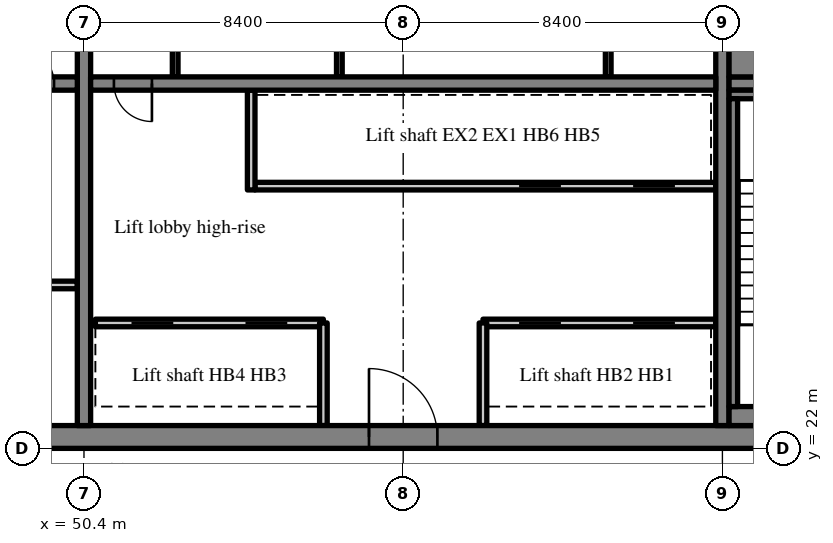
"""IFC4 building model, lengths in metres.
Left out: names, types, materials, properties, quantities, classifications, styles, units other than length and angle.
Written with IfcOpenShell. Run it as: python <this file> out.ifc"""

import sys

from ifc_helpers import new_model, si_unit, direction, frame, frame_2d, origin, place, context, subcontext, project, spatial, rectangle, extrude, source, transform, mapped, element, fill, save


model = new_model("IFC4")
c1 = context("Model", 3, precision=1e-05, world=origin(), true_north=direction((0.0, 1.0)))
c2 = subcontext(c1, "Body", "Model", "MODEL_VIEW")
j1 = project(units=[si_unit("LENGTHUNIT", "METRE"), si_unit("PLANEANGLEUNIT", "RADIAN")], contexts=[c1])
p1 = place(None, origin())
s1 = spatial("IfcSite", under=j1, at=p1, CompositionType="ELEMENT")
p2 = place(p1, origin())
s2 = spatial("IfcBuilding", under=s1, at=p2, CompositionType="ELEMENT")
p3 = place(p2, frame((0.0, 0.0, 221.8)))
s3 = spatial("IfcBuildingStorey", under=s2, at=p3, CompositionType="ELEMENT", Elevation=221.8)
m1 = source(origin(), c2, "Body", "SweptSolid", [
    extrude(rectangle(XDim=50.4, YDim=0.6, at=frame_2d((25.2, 0.0))), origin(), (0.0, 0.0, 1.0), 3.62),
])
p4 = place(p3, frame((25.2, 22.3, 0.0), z_axis=(0.0, 0.0, 1.0), x_axis=(1.0, 0.0, 0.0)))
e1 = element("IfcWall", 1, at=p4, inside=s3, PredefinedType="SHEAR", context=c2, shape_type="MappedRepresentation", body=[
    mapped(m1, transform((0.0, 0.0, 0.0), scale=1.0)),
])
m2 = source(origin(), c2, "Body", "SweptSolid", [
    extrude(rectangle(XDim=1.8, YDim=2.1, at=frame_2d((0.9, 1.05))), frame((0.0, 0.31, 0.0), z_axis=(0.0, -1.0, 0.0), x_axis=(1.0, 0.0, 0.0)), (0.0, 0.0, 1.0), 0.62),
])
p5 = place(p4, frame((15.9, 0.0, 0.0)))
e2 = element("IfcOpeningElement", 2, at=p5, cuts=e1, PredefinedType="OPENING", context=c2, shape_type="MappedRepresentation", body=[
    mapped(m2, transform((0.0, 0.0, 0.0), scale=1.0)),
])
m3 = source(origin(), c2, "Body", "SweptSolid", [
    extrude(rectangle(XDim=0.9, YDim=2.1, at=frame_2d((0.45, 1.05))), frame((0.0, 0.31, 0.0), z_axis=(0.0, -1.0, 0.0), x_axis=(1.0, 0.0, 0.0)), (0.0, 0.0, 1.0), 0.62),
])
p6 = place(p4, frame((9.687, 0.0, 0.0)))
e3 = element("IfcOpeningElement", 3, at=p6, cuts=e1, PredefinedType="OPENING", context=c2, shape_type="MappedRepresentation", body=[
    mapped(m3, transform((0.0, 0.0, 0.0), scale=1.0)),
])
p7 = place(p4, frame((21.513, 0.0, 0.0)))
e4 = element("IfcOpeningElement", 4, at=p7, cuts=e1, PredefinedType="OPENING", context=c2, shape_type="MappedRepresentation", body=[
    mapped(m3, transform((0.0, 0.0, 0.0), scale=1.0)),
])
p8 = place(p4, frame((32.7, 0.0, 0.0)))
e5 = element("IfcOpeningElement", 5, at=p8, cuts=e1, PredefinedType="OPENING", context=c2, shape_type="MappedRepresentation", body=[
    mapped(m2, transform((0.0, 0.0, 0.0), scale=1.0)),
])
m4 = source(origin(), c2, "Body", "SweptSolid", [
    extrude(rectangle(XDim=1.2, YDim=2.1, at=frame_2d((0.6, 1.05))), frame((0.0, 0.31, 0.0), z_axis=(0.0, -1.0, 0.0), x_axis=(1.0, 0.0, 0.0)), (0.0, 0.0, 1.0), 0.62),
])
p9 = place(p4, frame((6.488, 0.0, 0.0)))
e6 = element("IfcOpeningElement", 6, at=p9, cuts=e1, PredefinedType="OPENING", context=c2, shape_type="MappedRepresentation", body=[
    mapped(m4, transform((0.0, 0.0, 0.0), scale=1.0)),
])
p10 = place(p4, frame((47.925, 0.0, 0.0)))
e7 = element("IfcOpeningElement", 7, at=p10, cuts=e1, PredefinedType="OPENING", context=c2, shape_type="MappedRepresentation", body=[
    mapped(m4, transform((0.0, 0.0, 0.0), scale=1.0)),
])
m5 = source(origin(), c2, "Body", "SweptSolid", [
    extrude(rectangle(XDim=18.8, YDim=0.35, at=frame_2d((9.4, 0.0))), origin(), (0.0, 0.0, 1.0), 3.62),
])
p11 = place(p3, frame((50.4, 22.6, 0.0), z_axis=(0.0, 0.0, 1.0), x_axis=(0.0, 1.0, 0.0)))
e8 = element("IfcWall", 8, at=p11, inside=s3, PredefinedType="SHEAR", context=c2, shape_type="MappedRepresentation", body=[
    mapped(m5, transform((0.0, 0.0, 0.0), scale=1.0)),
])
m6 = source(origin(), c2, "Body", "SweptSolid", [
    extrude(rectangle(XDim=1.1, YDim=2.1, at=frame_2d((0.55, 1.05))), frame((0.0, 0.185, 0.0), z_axis=(0.0, -1.0, 0.0), x_axis=(1.0, 0.0, 0.0)), (0.0, 0.0, 1.0), 0.37),
])
p12 = place(p11, frame((12.85, 0.0, 0.0)))
e9 = element("IfcOpeningElement", 9, at=p12, cuts=e8, PredefinedType="OPENING", context=c2, shape_type="MappedRepresentation", body=[
    mapped(m6, transform((0.0, 0.0, 0.0), scale=1.0)),
])
p13 = place(p3, frame((67.2, 22.6, 0.0), z_axis=(0.0, 0.0, 1.0), x_axis=(0.0, 1.0, 0.0)))
e10 = element("IfcWall", 10, at=p13, inside=s3, PredefinedType="SHEAR", context=c2, shape_type="MappedRepresentation", body=[
    mapped(m5, transform((0.0, 0.0, 0.0), scale=1.0)),
])
m7 = source(origin(), c2, "Body", "SweptSolid", [
    extrude(rectangle(XDim=16.45, YDim=0.35, at=frame_2d((8.225, 0.0))), origin(), (0.0, 0.0, 1.0), 3.62),
])
p14 = place(p3, frame((33.775, 31.6, 0.0), z_axis=(0.0, 0.0, 1.0), x_axis=(1.0, 0.0, 0.0)))
e11 = element("IfcWall", 11, at=p14, inside=s3, PredefinedType="SHEAR", context=c2, shape_type="MappedRepresentation", body=[
    mapped(m7, transform((0.0, 0.0, 0.0), scale=1.0)),
])
m8 = source(origin(), c2, "Body", "SweptSolid", [
    extrude(rectangle(XDim=1.0, YDim=2.1, at=frame_2d((0.5, 1.05))), frame((0.0, 0.185, 0.0), z_axis=(0.0, -1.0, 0.0), x_axis=(1.0, 0.0, 0.0)), (0.0, 0.0, 1.0), 0.37),
])
p15 = place(p14, frame((14.837, 0.0, 0.0)))
e12 = element("IfcOpeningElement", 12, at=p15, cuts=e11, PredefinedType="OPENING", context=c2, shape_type="MappedRepresentation", body=[
    mapped(m8, transform((0.0, 0.0, 0.0), scale=1.0)),
])
m9 = source(origin(), c2, "Body", "SweptSolid", [
    extrude(rectangle(XDim=16.45, YDim=0.35, at=frame_2d((8.225, 0.0))), origin(), (0.0, 0.0, 1.0), 3.62),
])
p16 = place(p3, frame((50.575, 31.6, 0.0), z_axis=(0.0, 0.0, 1.0), x_axis=(1.0, 0.0, 0.0)))
e13 = element("IfcWall", 13, at=p16, inside=s3, PredefinedType="SHEAR", context=c2, shape_type="MappedRepresentation", body=[
    mapped(m9, transform((0.0, 0.0, 0.0), scale=1.0)),
])
p17 = place(p16, frame((0.613, 0.0, 0.0)))
e14 = element("IfcOpeningElement", 14, at=p17, cuts=e13, PredefinedType="OPENING", context=c2, shape_type="MappedRepresentation", body=[
    mapped(m8, transform((0.0, 0.0, 0.0), scale=1.0)),
])
m10 = source(origin(), c2, "Body", "SweptSolid", [
    extrude(rectangle(XDim=7.625, YDim=0.35, at=frame_2d((3.812, 0.0))), origin(), (0.0, 0.0, 1.0), 3.62),
])
p18 = place(p3, frame((67.375, 31.6, 0.0), z_axis=(0.0, 0.0, 1.0), x_axis=(1.0, 0.0, 0.0)))
e15 = element("IfcWall", 15, at=p18, inside=s3, PredefinedType="SHEAR", context=c2, shape_type="MappedRepresentation", body=[
    mapped(m10, transform((0.0, 0.0, 0.0), scale=1.0)),
])
p19 = place(p18, frame((5.8, 0.0, 0.0)))
e16 = element("IfcOpeningElement", 16, at=p19, cuts=e15, PredefinedType="OPENING", context=c2, shape_type="MappedRepresentation", body=[
    mapped(m6, transform((0.0, 0.0, 0.0), scale=1.0)),
])
m11 = source(origin(), c2, "Body", "SweptSolid", [
    extrude(rectangle(XDim=6.125, YDim=0.2, at=frame_2d((3.062, 0.0))), origin(), (0.0, 0.0, 1.0), 3.62),
])
p20 = place(p3, frame((44.1, 26.3, 0.0), z_axis=(0.0, 0.0, 1.0), x_axis=(1.0, 0.0, 0.0)))
e17 = element("IfcWall", 17, at=p20, inside=s3, PredefinedType="PARTITIONING", context=c2, shape_type="MappedRepresentation", body=[
    mapped(m11, transform((0.0, 0.0, 0.0), scale=1.0)),
])
p21 = place(p3, frame((67.025, 25.3, 0.0), z_axis=(0.0, 0.0, 1.0), x_axis=(-1.0, 0.0, 0.0)))
e18 = element("IfcWall", 18, at=p21, inside=s3, PredefinedType="SOLIDWALL", context=c2, shape_type="MappedRepresentation", body=[
    mapped(m11, transform((0.0, 0.0, 0.0), scale=1.0)),
])
m12 = source(origin(), c2, "Body", "SweptSolid", [
    extrude(rectangle(XDim=1.1, YDim=2.1, at=frame_2d((0.55, 1.05))), frame((0.0, 0.11, 0.0), z_axis=(0.0, -1.0, 0.0), x_axis=(1.0, 0.0, 0.0)), (0.0, 0.0, 1.0), 0.22),
])
p22 = place(p21, frame((1.075, 0.0, 0.0)))
e19 = element("IfcOpeningElement", 19, at=p22, cuts=e18, PredefinedType="OPENING", context=c2, shape_type="MappedRepresentation", body=[
    mapped(m12, transform((0.0, 0.0, 0.0), scale=1.0)),
])
p23 = place(p21, frame((4.075, 0.0, 0.0)))
e20 = element("IfcOpeningElement", 20, at=p23, cuts=e18, PredefinedType="OPENING", context=c2, shape_type="MappedRepresentation", body=[
    mapped(m12, transform((0.0, 0.0, 0.0), scale=1.0)),
])
m13 = source(origin(), c2, "Body", "SweptSolid", [
    extrude(rectangle(XDim=6.0, YDim=0.2, at=frame_2d((3.0, 0.0))), origin(), (0.0, 0.0, 1.0), 3.62),
])
p24 = place(p3, frame((56.7, 25.3, 0.0), z_axis=(0.0, 0.0, 1.0), x_axis=(-1.0, 0.0, 0.0)))
e21 = element("IfcWall", 21, at=p24, inside=s3, PredefinedType="SOLIDWALL", context=c2, shape_type="MappedRepresentation", body=[
    mapped(m13, transform((0.0, 0.0, 0.0), scale=1.0)),
])
p25 = place(p24, frame((0.95, 0.0, 0.0)))
e22 = element("IfcOpeningElement", 22, at=p25, cuts=e21, PredefinedType="OPENING", context=c2, shape_type="MappedRepresentation", body=[
    mapped(m12, transform((0.0, 0.0, 0.0), scale=1.0)),
])
p26 = place(p24, frame((3.95, 0.0, 0.0)))
e23 = element("IfcOpeningElement", 23, at=p26, cuts=e21, PredefinedType="OPENING", context=c2, shape_type="MappedRepresentation", body=[
    mapped(m12, transform((0.0, 0.0, 0.0), scale=1.0)),
])
m14 = source(origin(), c2, "Body", "SweptSolid", [
    extrude(rectangle(XDim=12.125, YDim=0.2, at=frame_2d((6.062, 0.0))), origin(), (0.0, 0.0, 1.0), 3.62),
])
p27 = place(p3, frame((67.025, 28.9, 0.0), z_axis=(0.0, 0.0, 1.0), x_axis=(-1.0, 0.0, 0.0)))
e24 = element("IfcWall", 24, at=p27, inside=s3, PredefinedType="SOLIDWALL", context=c2, shape_type="MappedRepresentation", body=[
    mapped(m14, transform((0.0, 0.0, 0.0), scale=1.0)),
])
p28 = place(p27, frame((1.075, 0.0, 0.0)))
e25 = element("IfcOpeningElement", 25, at=p28, cuts=e24, PredefinedType="OPENING", context=c2, shape_type="MappedRepresentation", body=[
    mapped(m12, transform((0.0, 0.0, 0.0), scale=1.0)),
])
p29 = place(p27, frame((4.075, 0.0, 0.0)))
e26 = element("IfcOpeningElement", 26, at=p29, cuts=e24, PredefinedType="OPENING", context=c2, shape_type="MappedRepresentation", body=[
    mapped(m12, transform((0.0, 0.0, 0.0), scale=1.0)),
])
m15 = source(origin(), c2, "Body", "SweptSolid", [
    extrude(rectangle(XDim=2.7, YDim=0.2, at=frame_2d((1.35, 0.0))), origin(), (0.0, 0.0, 1.0), 3.62),
])
for number, where, z_axis, x_axis in (
    (27, (60.9, 22.6, 0.0), (0.0, 0.0, 1.0), (0.0, 1.0, 0.0)),
    (28, (56.7, 22.6, 0.0), (0.0, 0.0, 1.0), (0.0, 1.0, 0.0)),
):
    element("IfcWall", number, at=place(p3, frame(where, z_axis=z_axis, x_axis=x_axis)), inside=s3, PredefinedType="SOLIDWALL", context=c2, shape_type="MappedRepresentation", body=[
        mapped(m15, transform((0.0, 0.0, 0.0), scale=1.0)),
    ])
m16 = source(origin(), c2, "Body", "SweptSolid", [
    extrude(rectangle(XDim=2.625, YDim=0.2, at=frame_2d((1.312, 0.0))), origin(), (0.0, 0.0, 1.0), 3.62),
])
p30 = place(p3, frame((54.8, 28.8, 0.0), z_axis=(0.0, 0.0, 1.0), x_axis=(0.0, 1.0, 0.0)))
e29 = element("IfcWall", 29, at=p30, inside=s3, PredefinedType="SOLIDWALL", context=c2, shape_type="MappedRepresentation", body=[
    mapped(m16, transform((0.0, 0.0, 0.0), scale=1.0)),
])
m17 = source(origin(), c2, "Body", "SweptSolid", [
    extrude(rectangle(XDim=3.225, YDim=0.15, at=frame_2d((1.613, 0.0))), origin(), (0.0, 0.0, 1.0), 3.62),
])
for number, where, z_axis, x_axis in (
    (30, (52.8, 31.775, 0.0), (0.0, 0.0, 1.0), (0.0, 1.0, 0.0)),
    (31, (64.195, 31.775, 0.0), (0.0, 0.0, 1.0), (0.0, 1.0, 0.0)),
    (32, (57.12, 31.775, 0.0), (0.0, 0.0, 1.0), (0.0, 1.0, 0.0)),
):
    element("IfcWall", number, at=place(p3, frame(where, z_axis=z_axis, x_axis=x_axis)), inside=s3, PredefinedType="PARTITIONING", context=c2, shape_type="MappedRepresentation", body=[
        mapped(m17, transform((0.0, 0.0, 0.0), scale=1.0)),
    ])
m18 = source(origin(), c2, "Body", "SweptSolid", [
    extrude(rectangle(XDim=4.875, YDim=0.5, at=frame_2d((2.438, 0.0))), origin(), (0.0, 0.0, 1.0), 3.62),
])
p31 = place(p3, frame((67.375, 22.85, 0.0), z_axis=(0.0, 0.0, 1.0), x_axis=(1.0, 0.0, 0.0)))
e33 = element("IfcWall", 33, at=p31, inside=s3, PredefinedType="SOLIDWALL", context=c2, shape_type="MappedRepresentation", body=[
    mapped(m18, transform((0.0, 0.0, 0.0), scale=1.0)),
])
m19 = source(origin(), c2, "Body", "SweptSolid", [
    extrude(rectangle(XDim=4.875, YDim=0.225, at=frame_2d((2.438, 0.0))), origin(), (0.0, 0.0, 1.0), 3.62),
])
p32 = place(p3, frame((67.375, 31.312, 0.0), z_axis=(0.0, 0.0, 1.0), x_axis=(1.0, 0.0, 0.0)))
e34 = element("IfcWall", 34, at=p32, inside=s3, PredefinedType="SOLIDWALL", context=c2, shape_type="MappedRepresentation", body=[
    mapped(m19, transform((0.0, 0.0, 0.0), scale=1.0)),
])
m20 = source(origin(), c2, "Body", "SweptSolid", [
    extrude(rectangle(XDim=8.1, YDim=0.225, at=frame_2d((4.05, 0.0))), origin(), (0.0, 0.0, 1.0), 3.62),
])
p33 = place(p3, frame((67.487, 23.1, 0.0), z_axis=(0.0, 0.0, 1.0), x_axis=(0.0, 1.0, 0.0)))
e35 = element("IfcWall", 35, at=p33, inside=s3, PredefinedType="SOLIDWALL", context=c2, shape_type="MappedRepresentation", body=[
    mapped(m20, transform((0.0, 0.0, 0.0), scale=1.0)),
])
m21 = source(origin(), c2, "Body", "SweptSolid", [
    extrude(rectangle(XDim=4.875, YDim=1.025, at=frame_2d((2.438, 0.0))), origin(), (0.0, 0.0, 1.0), 3.62),
])
p34 = place(p3, frame((67.375, 32.287, 0.0), z_axis=(0.0, 0.0, 1.0), x_axis=(1.0, 0.0, 0.0)))
e36 = element("IfcWall", 36, at=p34, inside=s3, PredefinedType="SOLIDWALL", context=c2, shape_type="MappedRepresentation", body=[
    mapped(m21, transform((0.0, 0.0, 0.0), scale=1.0)),
])
m22 = source(origin(), c2, "Body", "SweptSolid", [
    extrude(rectangle(XDim=1.0, YDim=2.1, at=frame_2d((0.5, 1.05))), frame((0.0, 0.025, 0.0), z_axis=(0.0, -1.0, 0.0), x_axis=(1.0, 0.0, 0.0)), (0.0, 0.0, 1.0), 0.05),
])
p35 = place(p15, origin())
e37 = element("IfcDoor", 37, at=p35, inside=s3, OperationType="SINGLE_SWING_LEFT", PredefinedType="DOOR", context=c2, shape_type="MappedRepresentation", body=[
    mapped(m22, transform((0.0, 0.0, 0.0), scale=1.0)),
])
fill(e12, e37)
m23 = source(origin(), c2, "Body", "SweptSolid", [
    extrude(rectangle(XDim=1.8, YDim=2.1, at=frame_2d((0.9, 1.05))), frame((0.0, 0.225, 0.0), z_axis=(0.0, -1.0, 0.0), x_axis=(1.0, 0.0, 0.0)), (0.0, 0.0, 1.0), 0.05),
])
p36 = place(p8, origin())
e38 = element("IfcDoor", 38, at=p36, inside=s3, OperationType="DOUBLE_DOOR_SINGLE_SWING", PredefinedType="DOOR", context=c2, shape_type="MappedRepresentation", body=[
    mapped(m23, transform((0.0, 0.0, 0.0), scale=1.0)),
])
fill(e5, e38)
p37 = place(p17, origin())
e39 = element("IfcDoor", 39, at=p37, inside=s3, OperationType="SINGLE_SWING_RIGHT", PredefinedType="DOOR", context=c2, shape_type="MappedRepresentation", body=[
    mapped(m22, transform((0.0, 0.0, 0.0), scale=1.0)),
])
fill(e14, e39)
m24 = source(origin(), c2, "Body", "SweptSolid", [
    extrude(rectangle(XDim=1.1, YDim=2.1, at=frame_2d((0.55, 1.05))), frame((0.0, 0.025, 0.0), z_axis=(0.0, -1.0, 0.0), x_axis=(1.0, 0.0, 0.0)), (0.0, 0.0, 1.0), 0.05),
])
p38 = place(p22, origin())
e40 = element("IfcDoor", 40, at=p38, inside=s3, OperationType="SLIDING_TO_RIGHT", PredefinedType="DOOR", context=c2, shape_type="MappedRepresentation", body=[
    mapped(m24, transform((0.0, 0.0, 0.0), scale=1.0)),
])
fill(e19, e40)
p39 = place(p23, origin())
e41 = element("IfcDoor", 41, at=p39, inside=s3, OperationType="SLIDING_TO_LEFT", PredefinedType="DOOR", context=c2, shape_type="MappedRepresentation", body=[
    mapped(m24, transform((0.0, 0.0, 0.0), scale=1.0)),
])
fill(e20, e41)
p40 = place(p25, origin())
e42 = element("IfcDoor", 42, at=p40, inside=s3, OperationType="SLIDING_TO_RIGHT", PredefinedType="DOOR", context=c2, shape_type="MappedRepresentation", body=[
    mapped(m24, transform((0.0, 0.0, 0.0), scale=1.0)),
])
fill(e22, e42)
p41 = place(p26, origin())
e43 = element("IfcDoor", 43, at=p41, inside=s3, OperationType="SLIDING_TO_LEFT", PredefinedType="DOOR", context=c2, shape_type="MappedRepresentation", body=[
    mapped(m24, transform((0.0, 0.0, 0.0), scale=1.0)),
])
fill(e23, e43)
p42 = place(p28, origin())
e44 = element("IfcDoor", 44, at=p42, inside=s3, OperationType="SLIDING_TO_RIGHT", PredefinedType="DOOR", context=c2, shape_type="MappedRepresentation", body=[
    mapped(m24, transform((0.0, 0.0, 0.0), scale=1.0)),
])
fill(e25, e44)
p43 = place(p29, origin())
e45 = element("IfcDoor", 45, at=p43, inside=s3, OperationType="SLIDING_TO_LEFT", PredefinedType="DOOR", context=c2, shape_type="MappedRepresentation", body=[
    mapped(m24, transform((0.0, 0.0, 0.0), scale=1.0)),
])
fill(e26, e45)
save(model, sys.argv[1])
